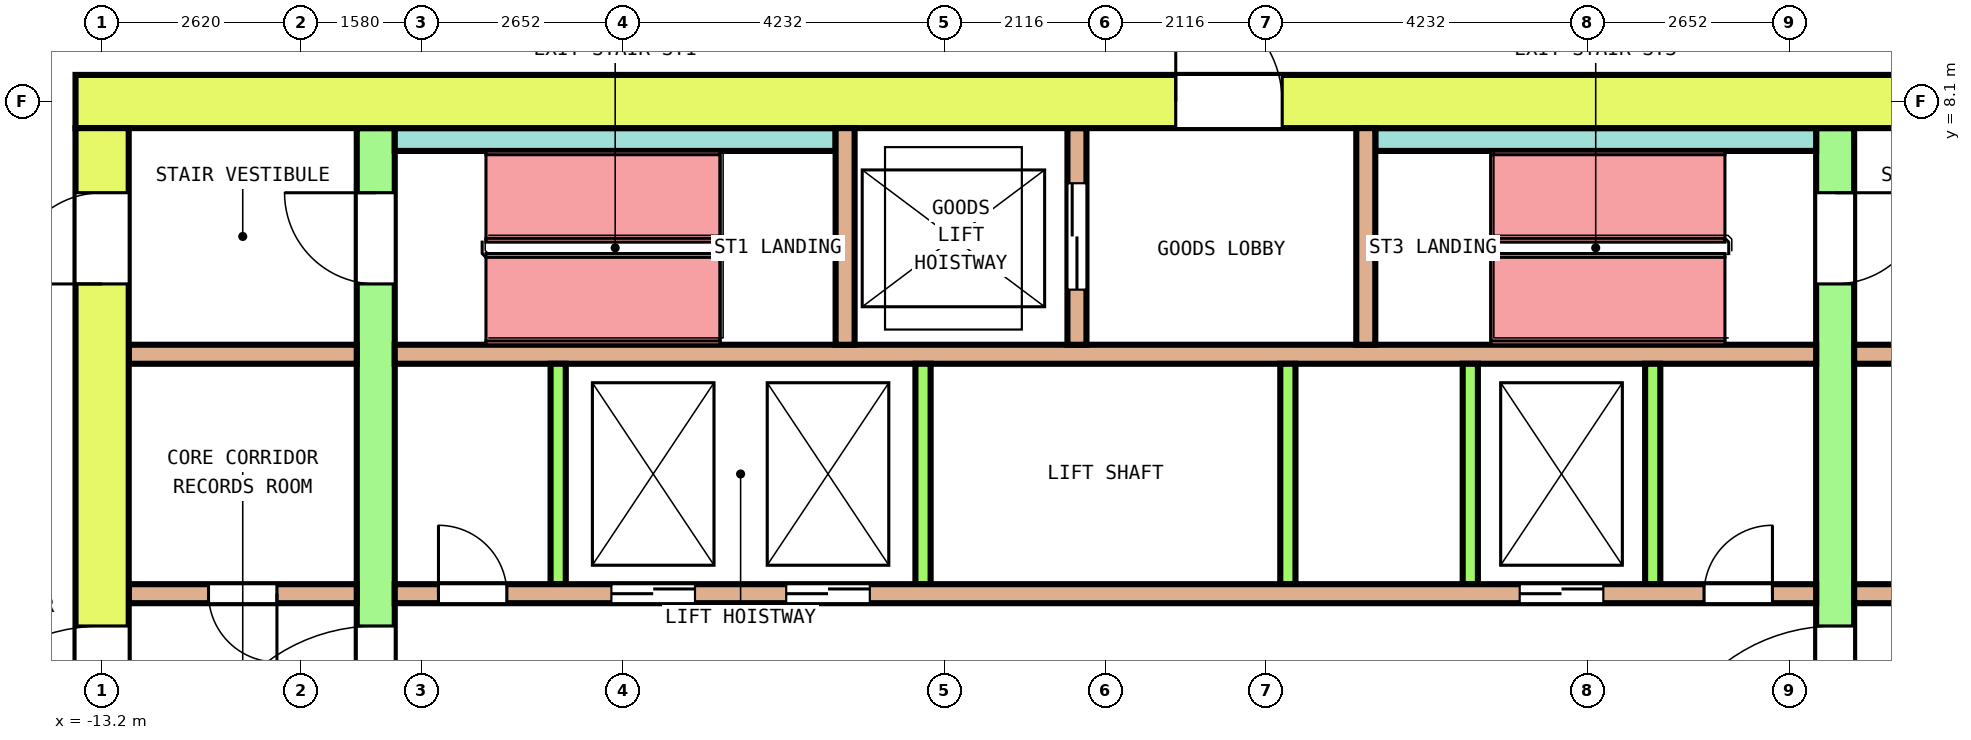
"""IFC4 building model, lengths in metres.
Left out: names, types, materials, properties, quantities, classifications, styles, units other than length and angle.
Written with IfcOpenShell. Run it as: python <this file> out.ifc"""

import sys

from ifc_helpers import new_model, si_unit, direction, frame, frame_2d, origin, place, context, subcontext, project, spatial, rectangle, extrude, element, fill, save


model = new_model("IFC4")
c1 = context("Model", 3, precision=1e-05, world=origin(), true_north=direction((0.0, 1.0)))
c2 = subcontext(c1, "Body", "Model", "MODEL_VIEW")
j1 = project(units=[si_unit("LENGTHUNIT", "METRE"), si_unit("PLANEANGLEUNIT", "RADIAN")], contexts=[c1])
p1 = place(None, origin())
s1 = spatial("IfcSite", under=j1, at=p1, CompositionType="ELEMENT")
p2 = place(p1, origin())
s2 = spatial("IfcBuilding", under=s1, at=p2, CompositionType="ELEMENT")
p3 = place(p2, frame((0.0, 0.0, 176.0)))
s3 = spatial("IfcBuildingStorey", under=s2, at=p3, CompositionType="ELEMENT", Elevation=176.0)
p4 = place(p3, frame((-13.55, 8.1, 0.0), z_axis=(0.0, 0.0, 1.0), x_axis=(1.0, 0.0, 0.0)))
e1 = element("IfcWall", 1, at=p4, inside=s3, PredefinedType="SHEAR", context=c2, shape_type="SweptSolid", body=[
    extrude(rectangle(XDim=27.1, YDim=0.7, at=frame_2d((13.55, 0.0))), origin(), (0.0, 0.0, 1.0), 4.1),
])
p5 = place(p4, frame((14.475, 0.0, 0.0)))
e2 = element("IfcOpeningElement", 2, at=p5, cuts=e1, PredefinedType="OPENING", context=c2, shape_type="SweptSolid", body=[
    extrude(rectangle(XDim=1.4, YDim=2.1, at=frame_2d((0.7, 1.05))), frame((0.0, 0.36, 0.0), z_axis=(0.0, -1.0, 0.0), x_axis=(1.0, 0.0, 0.0)), (0.0, 0.0, 1.0), 0.72),
])
p6 = place(p3, frame((-13.2, -7.75, 0.0), z_axis=(0.0, 0.0, 1.0), x_axis=(0.0, 1.0, 0.0)))
e3 = element("IfcWall", 3, at=p6, inside=s3, PredefinedType="SHEAR", context=c2, shape_type="SweptSolid", body=[
    extrude(rectangle(XDim=15.5, YDim=0.7, at=frame_2d((7.75, 0.0))), origin(), (0.0, 0.0, 1.0), 4.1),
])
p7 = place(p6, frame((6.55, 0.0, 0.0)))
e4 = element("IfcOpeningElement", 4, at=p7, cuts=e3, PredefinedType="OPENING", context=c2, shape_type="SweptSolid", body=[
    extrude(rectangle(XDim=2.4, YDim=2.1, at=frame_2d((1.2, 1.05))), frame((0.0, 0.36, 0.0), z_axis=(0.0, -1.0, 0.0), x_axis=(1.0, 0.0, 0.0)), (0.0, 0.0, 1.0), 0.72),
])
p8 = place(p6, frame((13.45, 0.0, 0.0)))
e5 = element("IfcOpeningElement", 5, at=p8, cuts=e3, PredefinedType="OPENING", context=c2, shape_type="SweptSolid", body=[
    extrude(rectangle(XDim=1.2, YDim=2.1, at=frame_2d((0.6, 1.05))), frame((0.0, 0.36, 0.0), z_axis=(0.0, -1.0, 0.0), x_axis=(1.0, 0.0, 0.0)), (0.0, 0.0, 1.0), 0.72),
])
p9 = place(p6, frame((0.85, 0.0, 0.0)))
e6 = element("IfcOpeningElement", 6, at=p9, cuts=e3, PredefinedType="OPENING", context=c2, shape_type="SweptSolid", body=[
    extrude(rectangle(XDim=1.2, YDim=2.1, at=frame_2d((0.6, 1.05))), frame((0.0, 0.36, 0.0), z_axis=(0.0, -1.0, 0.0), x_axis=(1.0, 0.0, 0.0)), (0.0, 0.0, 1.0), 0.72),
])
p10 = place(p3, frame((-9.6, -7.75, 0.0), z_axis=(0.0, 0.0, 1.0), x_axis=(0.0, 1.0, 0.0)))
e7 = element("IfcWall", 7, at=p10, inside=s3, PredefinedType="SHEAR", context=c2, shape_type="SweptSolid", body=[
    extrude(rectangle(XDim=15.5, YDim=0.5, at=frame_2d((7.75, 0.0))), origin(), (0.0, 0.0, 1.0), 4.1),
])
p11 = place(p10, frame((6.55, 0.0, 0.0)))
e8 = element("IfcOpeningElement", 8, at=p11, cuts=e7, PredefinedType="OPENING", context=c2, shape_type="SweptSolid", body=[
    extrude(rectangle(XDim=2.4, YDim=2.1, at=frame_2d((1.2, 1.05))), frame((0.0, 0.26, 0.0), z_axis=(0.0, -1.0, 0.0), x_axis=(1.0, 0.0, 0.0)), (0.0, 0.0, 1.0), 0.52),
])
p12 = place(p10, frame((13.45, 0.0, 0.0)))
e9 = element("IfcOpeningElement", 9, at=p12, cuts=e7, PredefinedType="OPENING", context=c2, shape_type="SweptSolid", body=[
    extrude(rectangle(XDim=1.2, YDim=2.1, at=frame_2d((0.6, 1.05))), frame((0.0, 0.26, 0.0), z_axis=(0.0, -1.0, 0.0), x_axis=(1.0, 0.0, 0.0)), (0.0, 0.0, 1.0), 0.52),
])
p13 = place(p10, frame((0.85, 0.0, 0.0)))
e10 = element("IfcOpeningElement", 10, at=p13, cuts=e7, PredefinedType="OPENING", context=c2, shape_type="SweptSolid", body=[
    extrude(rectangle(XDim=1.2, YDim=2.1, at=frame_2d((0.6, 1.05))), frame((0.0, 0.26, 0.0), z_axis=(0.0, -1.0, 0.0), x_axis=(1.0, 0.0, 0.0)), (0.0, 0.0, 1.0), 0.52),
])
p14 = place(p3, frame((9.6, -7.75, 0.0), z_axis=(0.0, 0.0, 1.0), x_axis=(0.0, 1.0, 0.0)))
e11 = element("IfcWall", 11, at=p14, inside=s3, PredefinedType="SHEAR", context=c2, shape_type="SweptSolid", body=[
    extrude(rectangle(XDim=15.5, YDim=0.5, at=frame_2d((7.75, 0.0))), origin(), (0.0, 0.0, 1.0), 4.1),
])
p15 = place(p14, frame((6.55, 0.0, 0.0)))
e12 = element("IfcOpeningElement", 12, at=p15, cuts=e11, PredefinedType="OPENING", context=c2, shape_type="SweptSolid", body=[
    extrude(rectangle(XDim=2.4, YDim=2.1, at=frame_2d((1.2, 1.05))), frame((0.0, 0.26, 0.0), z_axis=(0.0, -1.0, 0.0), x_axis=(1.0, 0.0, 0.0)), (0.0, 0.0, 1.0), 0.52),
])
p16 = place(p14, frame((13.45, 0.0, 0.0)))
e13 = element("IfcOpeningElement", 13, at=p16, cuts=e11, PredefinedType="OPENING", context=c2, shape_type="SweptSolid", body=[
    extrude(rectangle(XDim=1.2, YDim=2.1, at=frame_2d((0.6, 1.05))), frame((0.0, 0.26, 0.0), z_axis=(0.0, -1.0, 0.0), x_axis=(1.0, 0.0, 0.0)), (0.0, 0.0, 1.0), 0.52),
])
p17 = place(p14, frame((0.95, 0.0, 0.0)))
e14 = element("IfcOpeningElement", 14, at=p17, cuts=e11, PredefinedType="OPENING", context=c2, shape_type="SweptSolid", body=[
    extrude(rectangle(XDim=1.0, YDim=2.1, at=frame_2d((0.5, 1.05))), frame((0.0, 0.26, 0.0), z_axis=(0.0, -1.0, 0.0), x_axis=(1.0, 0.0, 0.0)), (0.0, 0.0, 1.0), 0.52),
])
p18 = place(p3, frame((-12.85, 1.625, 0.0), z_axis=(0.0, 0.0, 1.0), x_axis=(1.0, 0.0, 0.0)))
e15 = element("IfcWall", 15, at=p18, inside=s3, PredefinedType="SOLIDWALL", context=c2, shape_type="SweptSolid", body=[
    extrude(rectangle(XDim=3.0, YDim=0.25, at=frame_2d((1.5, 0.0))), origin(), (0.0, 0.0, 1.0), 4.1),
])
p19 = place(p18, frame((1.05, 0.0, 0.0)))
e16 = element("IfcOpeningElement", 16, at=p19, cuts=e15, PredefinedType="OPENING", context=c2, shape_type="SweptSolid", body=[
    extrude(rectangle(XDim=0.9, YDim=2.1, at=frame_2d((0.45, 1.05))), frame((0.0, 0.135, 0.0), z_axis=(0.0, -1.0, 0.0), x_axis=(1.0, 0.0, 0.0)), (0.0, 0.0, 1.0), 0.27),
])
p20 = place(p3, frame((-9.35, 1.625, 0.0), z_axis=(0.0, 0.0, 1.0), x_axis=(1.0, 0.0, 0.0)))
e17 = element("IfcWall", 17, at=p20, inside=s3, PredefinedType="SOLIDWALL", context=c2, shape_type="SweptSolid", body=[
    extrude(rectangle(XDim=18.7, YDim=0.25, at=frame_2d((9.35, 0.0))), origin(), (0.0, 0.0, 1.0), 4.1),
])
p21 = place(p20, frame((2.85, 0.0, 0.0)))
e18 = element("IfcOpeningElement", 18, at=p21, cuts=e17, PredefinedType="OPENING", context=c2, shape_type="SweptSolid", body=[
    extrude(rectangle(XDim=1.1, YDim=2.1, at=frame_2d((0.55, 1.05))), frame((0.0, 0.135, 0.0), z_axis=(0.0, -1.0, 0.0), x_axis=(1.0, 0.0, 0.0)), (0.0, 0.0, 1.0), 0.27),
])
p22 = place(p20, frame((5.15, 0.0, 0.0)))
e19 = element("IfcOpeningElement", 19, at=p22, cuts=e17, PredefinedType="OPENING", context=c2, shape_type="SweptSolid", body=[
    extrude(rectangle(XDim=1.1, YDim=2.1, at=frame_2d((0.55, 1.05))), frame((0.0, 0.135, 0.0), z_axis=(0.0, -1.0, 0.0), x_axis=(1.0, 0.0, 0.0)), (0.0, 0.0, 1.0), 0.27),
])
p23 = place(p20, frame((14.8, 0.0, 0.0)))
e20 = element("IfcOpeningElement", 20, at=p23, cuts=e17, PredefinedType="OPENING", context=c2, shape_type="SweptSolid", body=[
    extrude(rectangle(XDim=1.1, YDim=2.1, at=frame_2d((0.55, 1.05))), frame((0.0, 0.135, 0.0), z_axis=(0.0, -1.0, 0.0), x_axis=(1.0, 0.0, 0.0)), (0.0, 0.0, 1.0), 0.27),
])
p24 = place(p20, frame((0.575, 0.0, 0.0)))
e21 = element("IfcOpeningElement", 21, at=p24, cuts=e17, PredefinedType="OPENING", context=c2, shape_type="SweptSolid", body=[
    extrude(rectangle(XDim=0.9, YDim=2.1, at=frame_2d((0.45, 1.05))), frame((0.0, 0.135, 0.0), z_axis=(0.0, -1.0, 0.0), x_axis=(1.0, 0.0, 0.0)), (0.0, 0.0, 1.0), 0.27),
])
p25 = place(p20, frame((17.225, 0.0, 0.0)))
e22 = element("IfcOpeningElement", 22, at=p25, cuts=e17, PredefinedType="OPENING", context=c2, shape_type="SweptSolid", body=[
    extrude(rectangle(XDim=0.9, YDim=2.1, at=frame_2d((0.45, 1.05))), frame((0.0, 0.135, 0.0), z_axis=(0.0, -1.0, 0.0), x_axis=(1.0, 0.0, 0.0)), (0.0, 0.0, 1.0), 0.27),
])
p26 = place(p3, frame((9.85, 1.625, 0.0), z_axis=(0.0, 0.0, 1.0), x_axis=(1.0, 0.0, 0.0)))
e23 = element("IfcWall", 23, at=p26, inside=s3, PredefinedType="SOLIDWALL", context=c2, shape_type="SweptSolid", body=[
    extrude(rectangle(XDim=3.0, YDim=0.25, at=frame_2d((1.5, 0.0))), origin(), (0.0, 0.0, 1.0), 4.1),
])
p27 = place(p26, frame((1.05, 0.0, 0.0)))
e24 = element("IfcOpeningElement", 24, at=p27, cuts=e23, PredefinedType="OPENING", context=c2, shape_type="SweptSolid", body=[
    extrude(rectangle(XDim=0.9, YDim=2.1, at=frame_2d((0.45, 1.05))), frame((0.0, 0.135, 0.0), z_axis=(0.0, -1.0, 0.0), x_axis=(1.0, 0.0, 0.0)), (0.0, 0.0, 1.0), 0.27),
])
p28 = place(p3, frame((-12.85, 4.775, 0.0), z_axis=(0.0, 0.0, 1.0), x_axis=(1.0, 0.0, 0.0)))
e25 = element("IfcWall", 25, at=p28, inside=s3, PredefinedType="SOLIDWALL", context=c2, shape_type="SweptSolid", body=[
    extrude(rectangle(XDim=3.0, YDim=0.25, at=frame_2d((1.5, 0.0))), origin(), (0.0, 0.0, 1.0), 4.1),
])
p29 = place(p3, frame((-9.35, 4.775, 0.0), z_axis=(0.0, 0.0, 1.0), x_axis=(1.0, 0.0, 0.0)))
e26 = element("IfcWall", 26, at=p29, inside=s3, PredefinedType="SOLIDWALL", context=c2, shape_type="SweptSolid", body=[
    extrude(rectangle(XDim=18.7, YDim=0.25, at=frame_2d((9.35, 0.0))), origin(), (0.0, 0.0, 1.0), 4.1),
])
p30 = place(p3, frame((9.85, 4.775, 0.0), z_axis=(0.0, 0.0, 1.0), x_axis=(1.0, 0.0, 0.0)))
e27 = element("IfcWall", 27, at=p30, inside=s3, PredefinedType="SOLIDWALL", context=c2, shape_type="SweptSolid", body=[
    extrude(rectangle(XDim=3.0, YDim=0.25, at=frame_2d((1.5, 0.0))), origin(), (0.0, 0.0, 1.0), 4.1),
])
for number, where, z_axis, x_axis in (
    (28, (-7.2, 1.75, 0.0), (0.0, 0.0, 1.0), (0.0, 1.0, 0.0)),
    (29, (-2.4, 1.75, 0.0), (0.0, 0.0, 1.0), (0.0, 1.0, 0.0)),
    (30, (2.4, 1.75, 0.0), (0.0, 0.0, 1.0), (0.0, 1.0, 0.0)),
    (31, (4.8, 1.75, 0.0), (0.0, 0.0, 1.0), (0.0, 1.0, 0.0)),
    (32, (7.2, 1.75, 0.0), (0.0, 0.0, 1.0), (0.0, 1.0, 0.0)),
):
    element("IfcWall", number, at=place(p3, frame(where, z_axis=z_axis, x_axis=x_axis)), inside=s3, PredefinedType="SOLIDWALL", context=c2, shape_type="SweptSolid", body=[
        extrude(rectangle(XDim=2.9, YDim=0.2, at=frame_2d((1.45, 0.0))), origin(), (0.0, 0.0, 1.0), 4.1),
    ])
for number, where, z_axis, x_axis in (
    (33, (-9.35, 7.6, 0.0), (0.0, 0.0, 1.0), (1.0, 0.0, 0.0)),
    (34, (3.55, 7.6, 0.0), (0.0, 0.0, 1.0), (1.0, 0.0, 0.0)),
):
    element("IfcWall", number, at=place(p3, frame(where, z_axis=z_axis, x_axis=x_axis)), inside=s3, PredefinedType="SOLIDWALL", context=c2, shape_type="SweptSolid", body=[
        extrude(rectangle(XDim=5.8, YDim=0.3, at=frame_2d((2.9, 0.0))), origin(), (0.0, 0.0, 1.0), 4.1),
    ])
p31 = place(p3, frame((-3.425, 4.9, 0.0), z_axis=(0.0, 0.0, 1.0), x_axis=(0.0, 1.0, 0.0)))
e35 = element("IfcWall", 35, at=p31, inside=s3, PredefinedType="SOLIDWALL", context=c2, shape_type="SweptSolid", body=[
    extrude(rectangle(XDim=2.85, YDim=0.25, at=frame_2d((1.425, 0.0))), origin(), (0.0, 0.0, 1.0), 4.1),
])
p32 = place(p3, frame((-0.375, 4.9, 0.0), z_axis=(0.0, 0.0, 1.0), x_axis=(0.0, 1.0, 0.0)))
e36 = element("IfcWall", 36, at=p32, inside=s3, PredefinedType="SOLIDWALL", context=c2, shape_type="SweptSolid", body=[
    extrude(rectangle(XDim=2.85, YDim=0.25, at=frame_2d((1.425, 0.0))), origin(), (0.0, 0.0, 1.0), 4.1),
])
p33 = place(p32, frame((0.725, 0.0, 0.0)))
e37 = element("IfcOpeningElement", 37, at=p33, cuts=e36, PredefinedType="OPENING", context=c2, shape_type="SweptSolid", body=[
    extrude(rectangle(XDim=1.4, YDim=2.1, at=frame_2d((0.7, 1.05))), frame((0.0, 0.135, 0.0), z_axis=(0.0, -1.0, 0.0), x_axis=(1.0, 0.0, 0.0)), (0.0, 0.0, 1.0), 0.27),
])
p34 = place(p3, frame((3.425, 4.9, 0.0), z_axis=(0.0, 0.0, 1.0), x_axis=(0.0, 1.0, 0.0)))
e38 = element("IfcWall", 38, at=p34, inside=s3, PredefinedType="SOLIDWALL", context=c2, shape_type="SweptSolid", body=[
    extrude(rectangle(XDim=2.85, YDim=0.25, at=frame_2d((1.425, 0.0))), origin(), (0.0, 0.0, 1.0), 4.1),
])
p35 = place(p21, origin())
e39 = element("IfcDoor", 39, at=p35, inside=s3, OperationType="DOUBLE_DOOR_SLIDING", PredefinedType="DOOR", context=c2, shape_type="SweptSolid", body=[
    extrude(rectangle(XDim=1.1, YDim=2.1, at=frame_2d((0.55, 1.05))), frame((0.0, 0.075, 0.0), z_axis=(0.0, -1.0, 0.0), x_axis=(1.0, 0.0, 0.0)), (0.0, 0.0, 1.0), 0.15),
])
fill(e18, e39)
p36 = place(p22, origin())
e40 = element("IfcDoor", 40, at=p36, inside=s3, OperationType="DOUBLE_DOOR_SLIDING", PredefinedType="DOOR", context=c2, shape_type="SweptSolid", body=[
    extrude(rectangle(XDim=1.1, YDim=2.1, at=frame_2d((0.55, 1.05))), frame((0.0, 0.075, 0.0), z_axis=(0.0, -1.0, 0.0), x_axis=(1.0, 0.0, 0.0)), (0.0, 0.0, 1.0), 0.15),
])
fill(e19, e40)
p37 = place(p23, origin())
e41 = element("IfcDoor", 41, at=p37, inside=s3, OperationType="DOUBLE_DOOR_SLIDING", PredefinedType="DOOR", context=c2, shape_type="SweptSolid", body=[
    extrude(rectangle(XDim=1.1, YDim=2.1, at=frame_2d((0.55, 1.05))), frame((0.0, 0.075, 0.0), z_axis=(0.0, -1.0, 0.0), x_axis=(1.0, 0.0, 0.0)), (0.0, 0.0, 1.0), 0.15),
])
fill(e20, e41)
p38 = place(p33, origin())
e42 = element("IfcDoor", 42, at=p38, inside=s3, OperationType="DOUBLE_DOOR_SLIDING", PredefinedType="DOOR", context=c2, shape_type="SweptSolid", body=[
    extrude(rectangle(XDim=1.4, YDim=2.1, at=frame_2d((0.7, 1.05))), frame((0.0, 0.075, 0.0), z_axis=(0.0, -1.0, 0.0), x_axis=(1.0, 0.0, 0.0)), (0.0, 0.0, 1.0), 0.15),
])
fill(e37, e42)
p39 = place(p11, origin())
e43 = element("IfcDoor", 43, at=p39, inside=s3, OperationType="DOUBLE_DOOR_SINGLE_SWING", PredefinedType="DOOR", context=c2, shape_type="SweptSolid", body=[
    extrude(rectangle(XDim=2.4, YDim=2.1, at=frame_2d((1.2, 1.05))), frame((0.0, 0.2, 0.0), z_axis=(0.0, -1.0, 0.0), x_axis=(1.0, 0.0, 0.0)), (0.0, 0.0, 1.0), 0.4),
])
fill(e8, e43)
p40 = place(p15, origin())
e44 = element("IfcDoor", 44, at=p40, inside=s3, OperationType="DOUBLE_DOOR_SINGLE_SWING", PredefinedType="DOOR", context=c2, shape_type="SweptSolid", body=[
    extrude(rectangle(XDim=2.4, YDim=2.1, at=frame_2d((1.2, 1.05))), frame((0.0, 0.2, 0.0), z_axis=(0.0, -1.0, 0.0), x_axis=(1.0, 0.0, 0.0)), (0.0, 0.0, 1.0), 0.4),
])
fill(e12, e44)
p41 = place(p7, origin())
e45 = element("IfcDoor", 45, at=p41, inside=s3, OperationType="DOUBLE_DOOR_SINGLE_SWING", PredefinedType="DOOR", context=c2, shape_type="SweptSolid", body=[
    extrude(rectangle(XDim=2.4, YDim=2.1, at=frame_2d((1.2, 1.05))), frame((0.0, 0.3, 0.0), z_axis=(0.0, -1.0, 0.0), x_axis=(1.0, 0.0, 0.0)), (0.0, 0.0, 1.0), 0.6),
])
fill(e4, e45)
p42 = place(p12, origin())
e46 = element("IfcDoor", 46, at=p42, inside=s3, OperationType="SINGLE_SWING_LEFT", PredefinedType="DOOR", context=c2, shape_type="SweptSolid", body=[
    extrude(rectangle(XDim=1.2, YDim=2.1, at=frame_2d((0.6, 1.05))), frame((0.0, 0.2, 0.0), z_axis=(0.0, -1.0, 0.0), x_axis=(1.0, 0.0, 0.0)), (0.0, 0.0, 1.0), 0.4),
])
fill(e9, e46)
p43 = place(p8, origin())
e47 = element("IfcDoor", 47, at=p43, inside=s3, OperationType="SINGLE_SWING_RIGHT", PredefinedType="DOOR", context=c2, shape_type="SweptSolid", body=[
    extrude(rectangle(XDim=1.2, YDim=2.1, at=frame_2d((0.6, 1.05))), frame((0.0, 0.3, 0.0), z_axis=(0.0, -1.0, 0.0), x_axis=(1.0, 0.0, 0.0)), (0.0, 0.0, 1.0), 0.6),
])
fill(e5, e47)
p44 = place(p16, origin())
e48 = element("IfcDoor", 48, at=p44, inside=s3, OperationType="SINGLE_SWING_LEFT", PredefinedType="DOOR", context=c2, shape_type="SweptSolid", body=[
    extrude(rectangle(XDim=1.2, YDim=2.1, at=frame_2d((0.6, 1.05))), frame((0.0, 0.2, 0.0), z_axis=(0.0, -1.0, 0.0), x_axis=(1.0, 0.0, 0.0)), (0.0, 0.0, 1.0), 0.4),
])
fill(e13, e48)
p45 = place(p5, origin())
e49 = element("IfcDoor", 49, at=p45, inside=s3, OperationType="DOUBLE_DOOR_SINGLE_SWING", PredefinedType="DOOR", context=c2, shape_type="SweptSolid", body=[
    extrude(rectangle(XDim=1.4, YDim=2.1, at=frame_2d((0.7, 1.05))), frame((0.0, 0.3, 0.0), z_axis=(0.0, -1.0, 0.0), x_axis=(1.0, 0.0, 0.0)), (0.0, 0.0, 1.0), 0.6),
])
fill(e2, e49)
p46 = place(p19, origin())
e50 = element("IfcDoor", 50, at=p46, inside=s3, OperationType="SINGLE_SWING_LEFT", PredefinedType="DOOR", context=c2, shape_type="SweptSolid", body=[
    extrude(rectangle(XDim=0.9, YDim=2.1, at=frame_2d((0.45, 1.05))), frame((0.0, 0.075, 0.0), z_axis=(0.0, -1.0, 0.0), x_axis=(1.0, 0.0, 0.0)), (0.0, 0.0, 1.0), 0.15),
])
fill(e16, e50)
p47 = place(p24, origin())
e51 = element("IfcDoor", 51, at=p47, inside=s3, OperationType="SINGLE_SWING_RIGHT", PredefinedType="DOOR", context=c2, shape_type="SweptSolid", body=[
    extrude(rectangle(XDim=0.9, YDim=2.1, at=frame_2d((0.45, 1.05))), frame((0.0, 0.075, 0.0), z_axis=(0.0, -1.0, 0.0), x_axis=(1.0, 0.0, 0.0)), (0.0, 0.0, 1.0), 0.15),
])
fill(e21, e51)
p48 = place(p25, origin())
e52 = element("IfcDoor", 52, at=p48, inside=s3, OperationType="SINGLE_SWING_LEFT", PredefinedType="DOOR", context=c2, shape_type="SweptSolid", body=[
    extrude(rectangle(XDim=0.9, YDim=2.1, at=frame_2d((0.45, 1.05))), frame((0.0, 0.075, 0.0), z_axis=(0.0, -1.0, 0.0), x_axis=(1.0, 0.0, 0.0)), (0.0, 0.0, 1.0), 0.15),
])
fill(e22, e52)
save(model, sys.argv[1])
